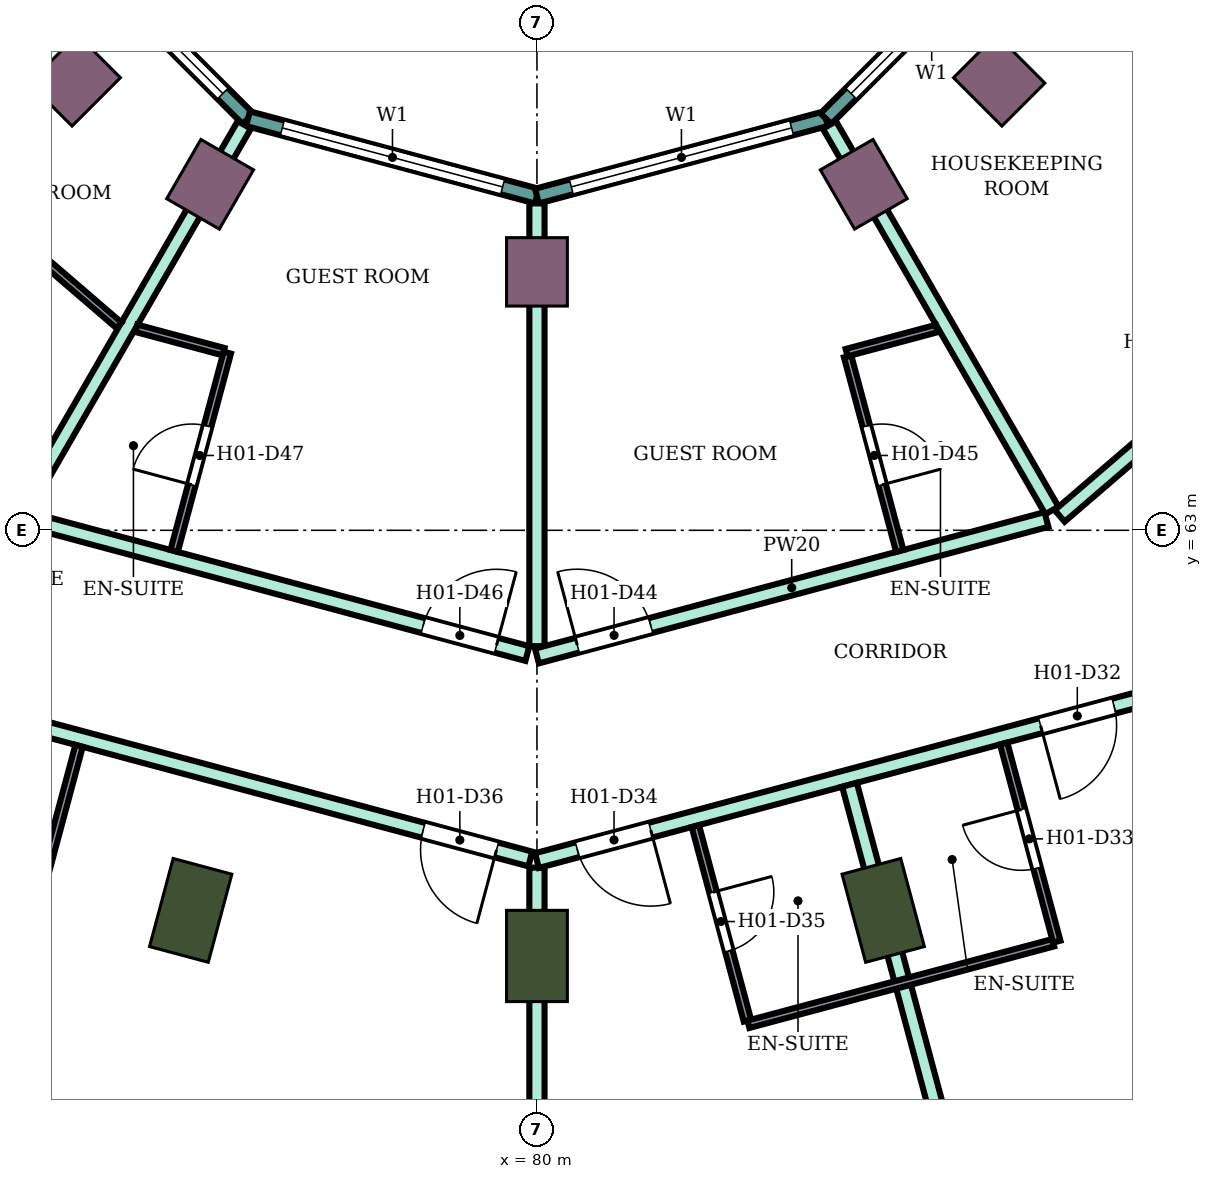
"""IFC4 building model, lengths in metres.
Left out: names, types, materials, properties, quantities, classifications, styles, units other than length and angle.
Written with IfcOpenShell. Run it as: python <this file> out.ifc"""

import sys

from ifc_helpers import new_model, si_unit, direction, frame, frame_2d, origin, origin_2d, place, context, subcontext, project, spatial, rectangle, extrude, element, fill, save


model = new_model("IFC4")
c1 = context("Model", 3, precision=1e-05, world=origin(), true_north=direction((0.0, 1.0)))
c2 = subcontext(c1, "Body", "Model", "MODEL_VIEW")
j1 = project(units=[si_unit("LENGTHUNIT", "METRE"), si_unit("PLANEANGLEUNIT", "RADIAN")], contexts=[c1])
p1 = place(None, origin())
s1 = spatial("IfcSite", under=j1, at=p1, CompositionType="ELEMENT")
p2 = place(p1, origin())
s2 = spatial("IfcBuilding", under=s1, at=p2, CompositionType="ELEMENT")
p3 = place(p2, frame((0.0, 0.0, 32.6)))
s3 = spatial("IfcBuildingStorey", under=s2, at=p3, CompositionType="ELEMENT", Elevation=32.6)
for number, where, z_axis, x_axis in (
    (1, (75.445, 58.0, 0.0), (0.0, 0.0, 1.0), (-0.259, -0.966, 0.0)),
    (2, (80.0, 57.4, 0.0), (0.0, 0.0, 1.0), (0.0, -1.0, 0.0)),
    (3, (84.555, 58.0, 0.0), (0.0, 0.0, 1.0), (0.259, -0.966, 0.0)),
):
    element("IfcColumn", number, at=place(p3, frame(where, z_axis=z_axis, x_axis=x_axis)), inside=s3, PredefinedType="COLUMN", context=c2, shape_type="SweptSolid", body=[
        extrude(rectangle(XDim=1.2, YDim=0.8, at=origin_2d()), origin(), (0.0, 0.0, 1.0), 3.8),
    ])
for number, where, z_axis, x_axis in (
    (4, (73.919, 68.919, 0.0), (0.0, 0.0, 1.0), (-0.707, -0.707, 0.0)),
    (5, (75.7, 67.552, 0.0), (0.0, 0.0, 1.0), (-0.5, -0.866, 0.0)),
    (6, (80.0, 66.4, 0.0), (0.0, 0.0, 1.0), (0.0, -1.0, 0.0)),
    (7, (84.3, 67.552, 0.0), (0.0, 0.0, 1.0), (0.5, -0.866, 0.0)),
    (8, (86.081, 68.919, 0.0), (0.0, 0.0, 1.0), (0.707, -0.707, 0.0)),
):
    element("IfcColumn", number, at=place(p3, frame(where, z_axis=z_axis, x_axis=x_axis)), inside=s3, PredefinedType="COLUMN", context=c2, shape_type="SweptSolid", body=[
        extrude(rectangle(XDim=0.9, YDim=0.8, at=origin_2d()), origin(), (0.0, 0.0, 1.0), 3.8),
    ])
p4 = place(p3, frame((73.415, 71.198, 0.0), z_axis=(0.0, 0.0, 1.0), x_axis=(0.707106781187, -0.707106781187, 0.0)))
e9 = element("IfcWall", 9, at=p4, inside=s3, PredefinedType="NOTDEFINED", context=c2, shape_type="SweptSolid", body=[
    extrude(rectangle(XDim=3.936, YDim=0.2, at=frame_2d((1.968, 0.0))), origin(), (0.0, 0.0, 1.0), 3.8),
])
p5 = place(p4, frame((0.468, 0.0, 0.9)))
e10 = element("IfcOpeningElement", 10, at=p5, cuts=e9, PredefinedType="OPENING", context=c2, shape_type="SweptSolid", body=[
    extrude(rectangle(XDim=3.0, YDim=2.3, at=frame_2d((1.5, 1.15))), frame((0.0, 0.11, 0.0), z_axis=(0.0, -1.0, 0.0), x_axis=(1.0, 0.0, 0.0)), (0.0, 0.0, 1.0), 0.22),
])
p6 = place(p3, frame((76.198, 68.415, 0.0), z_axis=(0.0, 0.0, 1.0), x_axis=(0.965933654434, -0.258789828301, 0.0)))
e11 = element("IfcWall", 11, at=p6, inside=s3, PredefinedType="NOTDEFINED", context=c2, shape_type="SweptSolid", body=[
    extrude(rectangle(XDim=3.936, YDim=0.2, at=frame_2d((1.968, 0.0))), origin(), (0.0, 0.0, 1.0), 3.8),
])
p7 = place(p6, frame((0.468, 0.0, 0.9)))
e12 = element("IfcOpeningElement", 12, at=p7, cuts=e11, PredefinedType="OPENING", context=c2, shape_type="SweptSolid", body=[
    extrude(rectangle(XDim=3.0, YDim=2.3, at=frame_2d((1.5, 1.15))), frame((0.0, 0.11, 0.0), z_axis=(0.0, -1.0, 0.0), x_axis=(1.0, 0.0, 0.0)), (0.0, 0.0, 1.0), 0.22),
])
p8 = place(p3, frame((80.0, 67.396, 0.0), z_axis=(0.0, 0.0, 1.0), x_axis=(0.965933654434, 0.258789828301, 0.0)))
e13 = element("IfcWall", 13, at=p8, inside=s3, PredefinedType="NOTDEFINED", context=c2, shape_type="SweptSolid", body=[
    extrude(rectangle(XDim=3.936, YDim=0.2, at=frame_2d((1.968, 0.0))), origin(), (0.0, 0.0, 1.0), 3.8),
])
p9 = place(p8, frame((0.468, 0.0, 0.9)))
e14 = element("IfcOpeningElement", 14, at=p9, cuts=e13, PredefinedType="OPENING", context=c2, shape_type="SweptSolid", body=[
    extrude(rectangle(XDim=3.0, YDim=2.3, at=frame_2d((1.5, 1.15))), frame((0.0, 0.11, 0.0), z_axis=(0.0, -1.0, 0.0), x_axis=(1.0, 0.0, 0.0)), (0.0, 0.0, 1.0), 0.22),
])
p10 = place(p3, frame((83.802, 68.415, 0.0), z_axis=(0.0, 0.0, 1.0), x_axis=(0.707106781187, 0.707106781187, 0.0)))
e15 = element("IfcWall", 15, at=p10, inside=s3, PredefinedType="NOTDEFINED", context=c2, shape_type="SweptSolid", body=[
    extrude(rectangle(XDim=3.936, YDim=0.2, at=frame_2d((1.968, 0.0))), origin(), (0.0, 0.0, 1.0), 3.8),
])
p11 = place(p10, frame((0.468, 0.0, 0.9)))
e16 = element("IfcOpeningElement", 16, at=p11, cuts=e15, PredefinedType="OPENING", context=c2, shape_type="SweptSolid", body=[
    extrude(rectangle(XDim=3.0, YDim=2.3, at=frame_2d((1.5, 1.15))), frame((0.0, 0.11, 0.0), z_axis=(0.0, -1.0, 0.0), x_axis=(1.0, 0.0, 0.0)), (0.0, 0.0, 1.0), 0.22),
])
p12 = place(p3, frame((71.877, 60.831, 0.0), z_axis=(0.0, 0.0, 1.0), x_axis=(0.965852509869, -0.259092510851, 0.0)))
e17 = element("IfcWall", 17, at=p12, inside=s3, PredefinedType="PARTITIONING", context=c2, shape_type="SweptSolid", body=[
    extrude(rectangle(XDim=8.32, YDim=0.2, at=frame_2d((4.16, 0.0))), origin(), (0.0, 0.0, 1.0), 3.35),
])
p13 = place(p12, frame((6.86, 0.0, 0.0)))
e18 = element("IfcOpeningElement", 18, at=p13, cuts=e17, PredefinedType="OPENING", context=c2, shape_type="SweptSolid", body=[
    extrude(rectangle(XDim=1.0, YDim=2.1, at=frame_2d((0.5, 1.05))), frame((0.0, 0.11, 0.0), z_axis=(0.0, -1.0, 0.0), x_axis=(1.0, 0.0, 0.0)), (0.0, 0.0, 1.0), 0.22),
])
p14 = place(p3, frame((73.297, 63.143, 0.0), z_axis=(0.0, 0.0, 1.0), x_axis=(0.965859030528, -0.25906820173, 0.0)))
e19 = element("IfcWall", 19, at=p14, inside=s3, PredefinedType="PARTITIONING", context=c2, shape_type="SweptSolid", body=[
    extrude(rectangle(XDim=6.81, YDim=0.2, at=frame_2d((3.405, 0.0))), origin(), (0.0, 0.0, 1.0), 3.35),
])
p15 = place(p14, frame((5.39, 0.0, 0.0)))
e20 = element("IfcOpeningElement", 20, at=p15, cuts=e19, PredefinedType="OPENING", context=c2, shape_type="SweptSolid", body=[
    extrude(rectangle(XDim=1.0, YDim=2.1, at=frame_2d((0.5, 1.05))), frame((0.0, 0.11, 0.0), z_axis=(0.0, -1.0, 0.0), x_axis=(1.0, 0.0, 0.0)), (0.0, 0.0, 1.0), 0.22),
])
p16 = place(p3, frame((73.171, 63.177, 0.0), z_axis=(0.0, 0.0, 1.0), x_axis=(0.500257106344, 0.865876912472, 0.0)))
e21 = element("IfcWall", 21, at=p16, inside=s3, PredefinedType="PARTITIONING", context=c2, shape_type="SweptSolid", body=[
    extrude(rectangle(XDim=5.955, YDim=0.2, at=frame_2d((2.978, 0.0))), origin(), (0.0, 0.0, 1.0), 3.35),
])
p17 = place(p3, frame((80.0, 51.801, 0.0), z_axis=(0.0, 0.0, 1.0), x_axis=(0.0, 1.0, 0.0)))
e22 = element("IfcWall", 22, at=p17, inside=s3, PredefinedType="PARTITIONING", context=c2, shape_type="SweptSolid", body=[
    extrude(rectangle(XDim=6.762, YDim=0.2, at=frame_2d((3.381, 0.0))), origin(), (0.0, 0.0, 1.0), 3.35),
])
p18 = place(p3, frame((80.0, 58.655, 0.0), z_axis=(0.0, 0.0, 1.0), x_axis=(0.965974635626, 0.258636817424, 0.0)))
e23 = element("IfcWall", 23, at=p18, inside=s3, PredefinedType="PARTITIONING", context=c2, shape_type="SweptSolid", body=[
    extrude(rectangle(XDim=8.36, YDim=0.2, at=frame_2d((4.18, 0.0))), origin(), (0.0, 0.0, 1.0), 3.35),
])
p19 = place(p18, frame((6.86, 0.0, 0.0)))
e24 = element("IfcOpeningElement", 24, at=p19, cuts=e23, PredefinedType="OPENING", context=c2, shape_type="SweptSolid", body=[
    extrude(rectangle(XDim=1.0, YDim=2.1, at=frame_2d((0.5, 1.05))), frame((0.0, 0.11, 0.0), z_axis=(0.0, -1.0, 0.0), x_axis=(1.0, 0.0, 0.0)), (0.0, 0.0, 1.0), 0.22),
])
p20 = place(p18, frame((0.55, 0.0, 0.0)))
e25 = element("IfcOpeningElement", 25, at=p20, cuts=e23, PredefinedType="OPENING", context=c2, shape_type="SweptSolid", body=[
    extrude(rectangle(XDim=1.0, YDim=2.1, at=frame_2d((0.5, 1.05))), frame((0.0, 0.11, 0.0), z_axis=(0.0, -1.0, 0.0), x_axis=(1.0, 0.0, 0.0)), (0.0, 0.0, 1.0), 0.22),
])
p21 = place(p3, frame((80.0, 61.476, 0.0), z_axis=(0.0, 0.0, 1.0), x_axis=(0.0, 1.0, 0.0)))
e26 = element("IfcWall", 26, at=p21, inside=s3, PredefinedType="PARTITIONING", context=c2, shape_type="SweptSolid", body=[
    extrude(rectangle(XDim=5.825, YDim=0.2, at=frame_2d((2.913, 0.0))), origin(), (0.0, 0.0, 1.0), 3.35),
])
p22 = place(p3, frame((80.0, 61.346, 0.0), z_axis=(0.0, 0.0, 1.0), x_axis=(0.965924181808, 0.258825182312, 0.0)))
e27 = element("IfcWall", 27, at=p22, inside=s3, PredefinedType="PARTITIONING", context=c2, shape_type="SweptSolid", body=[
    extrude(rectangle(XDim=6.94, YDim=0.2, at=frame_2d((3.47, 0.0))), origin(), (0.0, 0.0, 1.0), 3.35),
])
p23 = place(p22, frame((0.55, 0.0, 0.0)))
e28 = element("IfcOpeningElement", 28, at=p23, cuts=e27, PredefinedType="OPENING", context=c2, shape_type="SweptSolid", body=[
    extrude(rectangle(XDim=1.0, YDim=2.1, at=frame_2d((0.5, 1.05))), frame((0.0, 0.11, 0.0), z_axis=(0.0, -1.0, 0.0), x_axis=(1.0, 0.0, 0.0)), (0.0, 0.0, 1.0), 0.22),
])
p24 = place(p3, frame((83.848, 68.333, 0.0), z_axis=(0.0, 0.0, 1.0), x_axis=(0.499951054106, -0.866053660865, 0.0)))
e29 = element("IfcWall", 29, at=p24, inside=s3, PredefinedType="PARTITIONING", context=c2, shape_type="SweptSolid", body=[
    extrude(rectangle(XDim=5.855, YDim=0.2, at=frame_2d((2.927, 0.0))), origin(), (0.0, 0.0, 1.0), 3.35),
])
p25 = place(p3, frame((84.112, 59.652, 0.0), z_axis=(0.0, 0.0, 1.0), x_axis=(0.258791091927, -0.965933315886, 0.0)))
e30 = element("IfcWall", 30, at=p25, inside=s3, PredefinedType="PARTITIONING", context=c2, shape_type="SweptSolid", body=[
    extrude(rectangle(XDim=9.909, YDim=0.2, at=frame_2d((4.955, 0.0))), origin(), (0.0, 0.0, 1.0), 3.35),
])
p26 = place(p3, frame((86.877, 63.189, 0.0), z_axis=(0.0, 0.0, 1.0), x_axis=(0.758075808328, 0.652166442581, 0.0)))
e31 = element("IfcWall", 31, at=p26, inside=s3, PredefinedType="PARTITIONING", context=c2, shape_type="SweptSolid", body=[
    extrude(rectangle(XDim=5.23, YDim=0.2, at=frame_2d((2.615, 0.0))), origin(), (0.0, 0.0, 1.0), 3.35),
])
p27 = place(p26, frame((2.165, 0.0, 0.0)))
e32 = element("IfcOpeningElement", 32, at=p27, cuts=e31, PredefinedType="OPENING", context=c2, shape_type="SweptSolid", body=[
    extrude(rectangle(XDim=0.9, YDim=2.1, at=frame_2d((0.45, 1.05))), frame((0.0, 0.11, 0.0), z_axis=(0.0, -1.0, 0.0), x_axis=(1.0, 0.0, 0.0)), (0.0, 0.0, 1.0), 0.22),
])
p28 = place(p3, frame((73.277, 57.557, 0.0), z_axis=(0.0, 0.0, 1.0), x_axis=(0.258928960762, 0.965896367774, 0.0)))
e33 = element("IfcWall", 33, at=p28, inside=s3, PredefinedType="PARTITIONING", context=c2, shape_type="SweptSolid", body=[
    extrude(rectangle(XDim=2.699, YDim=0.1, at=frame_2d((1.35, 0.0))), origin(), (0.0, 0.0, 1.0), 3.35),
])
p29 = place(p3, frame((73.357, 66.681, 0.0), z_axis=(0.0, 0.0, 1.0), x_axis=(0.758263469747, -0.651948242154, 0.0)))
e34 = element("IfcWall", 34, at=p29, inside=s3, PredefinedType="PARTITIONING", context=c2, shape_type="SweptSolid", body=[
    extrude(rectangle(XDim=1.511, YDim=0.1, at=frame_2d((0.755, 0.0))), origin(), (0.0, 0.0, 1.0), 3.35),
])
p30 = place(p3, frame((74.729, 65.657, 0.0), z_axis=(0.0, 0.0, 1.0), x_axis=(0.965948051503, -0.258736085224, 0.0)))
e35 = element("IfcWall", 35, at=p30, inside=s3, PredefinedType="PARTITIONING", context=c2, shape_type="SweptSolid", body=[
    extrude(rectangle(XDim=1.189, YDim=0.1, at=frame_2d((0.594, 0.0))), origin(), (0.0, 0.0, 1.0), 3.35),
])
p31 = place(p3, frame((75.227, 62.729, 0.0), z_axis=(0.0, 0.0, 1.0), x_axis=(0.258945475746, 0.965891940432, 0.0)))
e36 = element("IfcWall", 36, at=p31, inside=s3, PredefinedType="PARTITIONING", context=c2, shape_type="SweptSolid", body=[
    extrude(rectangle(XDim=2.7, YDim=0.1, at=frame_2d((1.35, 0.0))), origin(), (0.0, 0.0, 1.0), 3.35),
])
p32 = place(p31, frame((0.9, 0.0, 0.0)))
e37 = element("IfcOpeningElement", 37, at=p32, cuts=e36, PredefinedType="OPENING", context=c2, shape_type="SweptSolid", body=[
    extrude(rectangle(XDim=0.8, YDim=2.1, at=frame_2d((0.4, 1.05))), frame((0.0, 0.06, 0.0), z_axis=(0.0, -1.0, 0.0), x_axis=(1.0, 0.0, 0.0)), (0.0, 0.0, 1.0), 0.12),
])
p33 = place(p3, frame((82.084, 59.108, 0.0), z_axis=(0.0, 0.0, 1.0), x_axis=(0.258591746437, -0.965986702121, 0.0)))
e38 = element("IfcWall", 38, at=p33, inside=s3, PredefinedType="PARTITIONING", context=c2, shape_type="SweptSolid", body=[
    extrude(rectangle(XDim=2.649, YDim=0.1, at=frame_2d((1.325, 0.0))), origin(), (0.0, 0.0, 1.0), 3.35),
])
p34 = place(p33, frame((0.9, 0.0, 0.0)))
e39 = element("IfcOpeningElement", 39, at=p34, cuts=e38, PredefinedType="OPENING", context=c2, shape_type="SweptSolid", body=[
    extrude(rectangle(XDim=0.8, YDim=2.1, at=frame_2d((0.4, 1.05))), frame((0.0, 0.06, 0.0), z_axis=(0.0, -1.0, 0.0), x_axis=(1.0, 0.0, 0.0)), (0.0, 0.0, 1.0), 0.12),
])
p35 = place(p3, frame((82.782, 56.501, 0.0), z_axis=(0.0, 0.0, 1.0), x_axis=(0.965999228418, 0.258544949083, 0.0)))
e40 = element("IfcWall", 40, at=p35, inside=s3, PredefinedType="PARTITIONING", context=c2, shape_type="SweptSolid", body=[
    extrude(rectangle(XDim=4.15, YDim=0.1, at=frame_2d((2.075, 0.0))), origin(), (0.0, 0.0, 1.0), 3.35),
])
p36 = place(p3, frame((84.087, 65.289, 0.0), z_axis=(0.0, 0.0, 1.0), x_axis=(0.258929459649, -0.965896234037, 0.0)))
e41 = element("IfcWall", 41, at=p36, inside=s3, PredefinedType="PARTITIONING", context=c2, shape_type="SweptSolid", body=[
    extrude(rectangle(XDim=2.65, YDim=0.1, at=frame_2d((1.325, 0.0))), origin(), (0.0, 0.0, 1.0), 3.35),
])
p37 = place(p36, frame((0.95, 0.0, 0.0)))
e42 = element("IfcOpeningElement", 42, at=p37, cuts=e41, PredefinedType="OPENING", context=c2, shape_type="SweptSolid", body=[
    extrude(rectangle(XDim=0.8, YDim=2.1, at=frame_2d((0.4, 1.05))), frame((0.0, 0.06, 0.0), z_axis=(0.0, -1.0, 0.0), x_axis=(1.0, 0.0, 0.0)), (0.0, 0.0, 1.0), 0.12),
])
p38 = place(p3, frame((84.074, 65.337, 0.0), z_axis=(0.0, 0.0, 1.0), x_axis=(0.965914351064, 0.258861867428, 0.0)))
e43 = element("IfcWall", 43, at=p38, inside=s3, PredefinedType="PARTITIONING", context=c2, shape_type="SweptSolid", body=[
    extrude(rectangle(XDim=1.229, YDim=0.1, at=frame_2d((0.615, 0.0))), origin(), (0.0, 0.0, 1.0), 3.35),
])
p39 = place(p3, frame((86.14, 60.196, 0.0), z_axis=(0.0, 0.0, 1.0), x_axis=(0.258945475746, -0.965891940432, 0.0)))
e44 = element("IfcWall", 44, at=p39, inside=s3, PredefinedType="PARTITIONING", context=c2, shape_type="SweptSolid", body=[
    extrude(rectangle(XDim=2.7, YDim=0.1, at=frame_2d((1.35, 0.0))), origin(), (0.0, 0.0, 1.0), 3.35),
])
p40 = place(p39, frame((0.9, 0.0, 0.0)))
e45 = element("IfcOpeningElement", 45, at=p40, cuts=e44, PredefinedType="OPENING", context=c2, shape_type="SweptSolid", body=[
    extrude(rectangle(XDim=0.8, YDim=2.1, at=frame_2d((0.4, 1.05))), frame((0.0, 0.06, 0.0), z_axis=(0.0, -1.0, 0.0), x_axis=(1.0, 0.0, 0.0)), (0.0, 0.0, 1.0), 0.12),
])
p41 = place(p5, origin())
e46 = element("IfcWindow", 46, at=p41, inside=s3, PartitioningType="SINGLE_PANEL", PredefinedType="WINDOW", context=c2, shape_type="SweptSolid", body=[
    extrude(rectangle(XDim=3.0, YDim=2.3, at=frame_2d((1.5, 1.15))), frame((0.0, 0.03, 0.0), z_axis=(0.0, -1.0, 0.0), x_axis=(1.0, 0.0, 0.0)), (0.0, 0.0, 1.0), 0.06),
])
fill(e10, e46)
p42 = place(p7, origin())
e47 = element("IfcWindow", 47, at=p42, inside=s3, PartitioningType="SINGLE_PANEL", PredefinedType="WINDOW", context=c2, shape_type="SweptSolid", body=[
    extrude(rectangle(XDim=3.0, YDim=2.3, at=frame_2d((1.5, 1.15))), frame((0.0, 0.03, 0.0), z_axis=(0.0, -1.0, 0.0), x_axis=(1.0, 0.0, 0.0)), (0.0, 0.0, 1.0), 0.06),
])
fill(e12, e47)
p43 = place(p9, origin())
e48 = element("IfcWindow", 48, at=p43, inside=s3, PartitioningType="SINGLE_PANEL", PredefinedType="WINDOW", context=c2, shape_type="SweptSolid", body=[
    extrude(rectangle(XDim=3.0, YDim=2.3, at=frame_2d((1.5, 1.15))), frame((0.0, 0.03, 0.0), z_axis=(0.0, -1.0, 0.0), x_axis=(1.0, 0.0, 0.0)), (0.0, 0.0, 1.0), 0.06),
])
fill(e14, e48)
p44 = place(p11, origin())
e49 = element("IfcWindow", 49, at=p44, inside=s3, PartitioningType="SINGLE_PANEL", PredefinedType="WINDOW", context=c2, shape_type="SweptSolid", body=[
    extrude(rectangle(XDim=3.0, YDim=2.3, at=frame_2d((1.5, 1.15))), frame((0.0, 0.03, 0.0), z_axis=(0.0, -1.0, 0.0), x_axis=(1.0, 0.0, 0.0)), (0.0, 0.0, 1.0), 0.06),
])
fill(e16, e49)
p45 = place(p19, frame((1.0, 0.0, 0.0), z_axis=(0.0, 0.0, 1.0), x_axis=(-1.0, 0.0, 0.0)))
e50 = element("IfcDoor", 50, at=p45, inside=s3, OperationType="SINGLE_SWING_RIGHT", PredefinedType="DOOR", context=c2, shape_type="SweptSolid", body=[
    extrude(rectangle(XDim=1.0, YDim=2.1, at=frame_2d((0.5, 1.05))), frame((0.0, 0.025, 0.0), z_axis=(0.0, -1.0, 0.0), x_axis=(1.0, 0.0, 0.0)), (0.0, 0.0, 1.0), 0.05),
])
fill(e24, e50)
p46 = place(p40, frame((0.8, 0.0, 0.0), z_axis=(0.0, 0.0, 1.0), x_axis=(-1.0, 0.0, 0.0)))
e51 = element("IfcDoor", 51, at=p46, inside=s3, OperationType="SINGLE_SWING_RIGHT", PredefinedType="DOOR", context=c2, shape_type="SweptSolid", body=[
    extrude(rectangle(XDim=0.8, YDim=2.1, at=frame_2d((0.4, 1.05))), frame((0.0, 0.025, 0.0), z_axis=(0.0, -1.0, 0.0), x_axis=(1.0, 0.0, 0.0)), (0.0, 0.0, 1.0), 0.05),
])
fill(e45, e51)
p47 = place(p20, frame((1.0, 0.0, 0.0), z_axis=(0.0, 0.0, 1.0), x_axis=(-1.0, 0.0, 0.0)))
e52 = element("IfcDoor", 52, at=p47, inside=s3, OperationType="SINGLE_SWING_LEFT", PredefinedType="DOOR", context=c2, shape_type="SweptSolid", body=[
    extrude(rectangle(XDim=1.0, YDim=2.1, at=frame_2d((0.5, 1.05))), frame((0.0, 0.025, 0.0), z_axis=(0.0, -1.0, 0.0), x_axis=(1.0, 0.0, 0.0)), (0.0, 0.0, 1.0), 0.05),
])
fill(e25, e52)
p48 = place(p34, origin())
e53 = element("IfcDoor", 53, at=p48, inside=s3, OperationType="SINGLE_SWING_LEFT", PredefinedType="DOOR", context=c2, shape_type="SweptSolid", body=[
    extrude(rectangle(XDim=0.8, YDim=2.1, at=frame_2d((0.4, 1.05))), frame((0.0, 0.025, 0.0), z_axis=(0.0, -1.0, 0.0), x_axis=(1.0, 0.0, 0.0)), (0.0, 0.0, 1.0), 0.05),
])
fill(e39, e53)
p49 = place(p13, frame((1.0, 0.0, 0.0), z_axis=(0.0, 0.0, 1.0), x_axis=(-1.0, 0.0, 0.0)))
e54 = element("IfcDoor", 54, at=p49, inside=s3, OperationType="SINGLE_SWING_LEFT", PredefinedType="DOOR", context=c2, shape_type="SweptSolid", body=[
    extrude(rectangle(XDim=1.0, YDim=2.1, at=frame_2d((0.5, 1.05))), frame((0.0, 0.025, 0.0), z_axis=(0.0, -1.0, 0.0), x_axis=(1.0, 0.0, 0.0)), (0.0, 0.0, 1.0), 0.05),
])
fill(e18, e54)
p50 = place(p23, origin())
e55 = element("IfcDoor", 55, at=p50, inside=s3, OperationType="SINGLE_SWING_LEFT", PredefinedType="DOOR", context=c2, shape_type="SweptSolid", body=[
    extrude(rectangle(XDim=1.0, YDim=2.1, at=frame_2d((0.5, 1.05))), frame((0.0, 0.025, 0.0), z_axis=(0.0, -1.0, 0.0), x_axis=(1.0, 0.0, 0.0)), (0.0, 0.0, 1.0), 0.05),
])
fill(e28, e55)
p51 = place(p37, origin())
e56 = element("IfcDoor", 56, at=p51, inside=s3, OperationType="SINGLE_SWING_RIGHT", PredefinedType="DOOR", context=c2, shape_type="SweptSolid", body=[
    extrude(rectangle(XDim=0.8, YDim=2.1, at=frame_2d((0.4, 1.05))), frame((0.0, 0.025, 0.0), z_axis=(0.0, -1.0, 0.0), x_axis=(1.0, 0.0, 0.0)), (0.0, 0.0, 1.0), 0.05),
])
fill(e42, e56)
p52 = place(p15, origin())
e57 = element("IfcDoor", 57, at=p52, inside=s3, OperationType="SINGLE_SWING_RIGHT", PredefinedType="DOOR", context=c2, shape_type="SweptSolid", body=[
    extrude(rectangle(XDim=1.0, YDim=2.1, at=frame_2d((0.5, 1.05))), frame((0.0, 0.025, 0.0), z_axis=(0.0, -1.0, 0.0), x_axis=(1.0, 0.0, 0.0)), (0.0, 0.0, 1.0), 0.05),
])
fill(e20, e57)
p53 = place(p32, origin())
e58 = element("IfcDoor", 58, at=p53, inside=s3, OperationType="SINGLE_SWING_LEFT", PredefinedType="DOOR", context=c2, shape_type="SweptSolid", body=[
    extrude(rectangle(XDim=0.8, YDim=2.1, at=frame_2d((0.4, 1.05))), frame((0.0, 0.025, 0.0), z_axis=(0.0, -1.0, 0.0), x_axis=(1.0, 0.0, 0.0)), (0.0, 0.0, 1.0), 0.05),
])
fill(e37, e58)
save(model, sys.argv[1])
